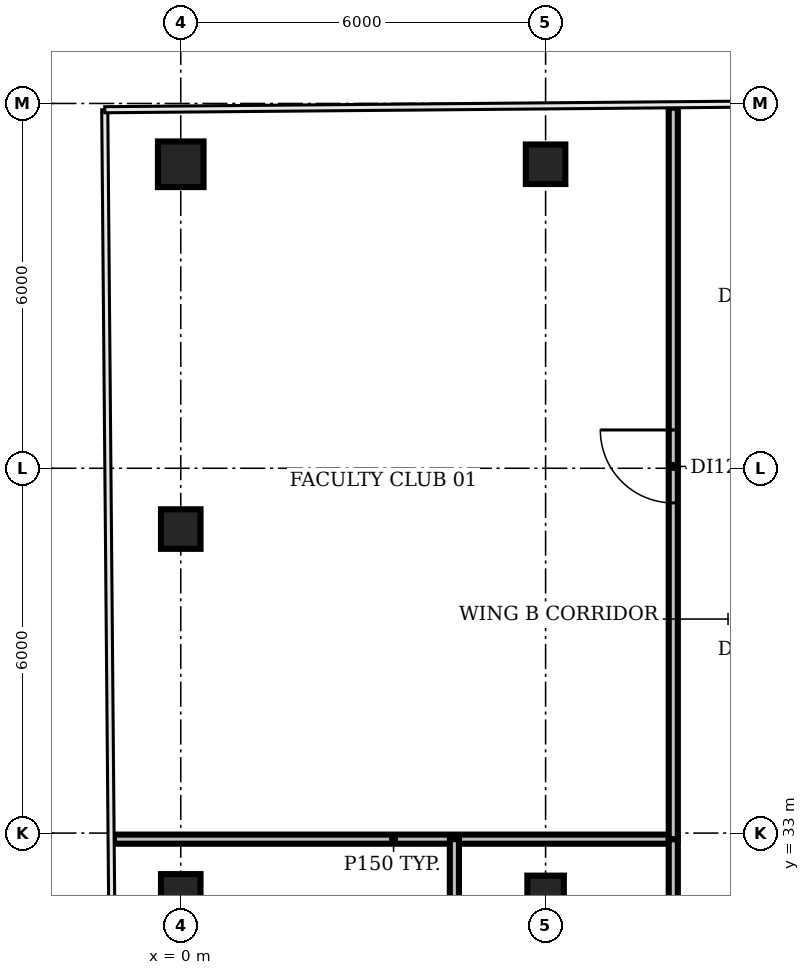
"""IFC4 building model, lengths in metres.
Left out: names, types, materials, properties, quantities, classifications, styles, units other than length and angle.
Written with IfcOpenShell. Run it as: python <this file> out.ifc"""

import sys

from ifc_helpers import new_model, si_unit, direction, frame, frame_2d, origin, origin_2d, place, context, subcontext, project, spatial, rectangle, circle, extrude, element, fill, save


model = new_model("IFC4")
c1 = context("Model", 3, precision=1e-05, world=origin(), true_north=direction((0.0, 1.0)))
c2 = subcontext(c1, "Body", "Model", "MODEL_VIEW")
j1 = project(units=[si_unit("LENGTHUNIT", "METRE"), si_unit("PLANEANGLEUNIT", "RADIAN")], contexts=[c1])
p1 = place(None, origin())
s1 = spatial("IfcSite", under=j1, at=p1, CompositionType="ELEMENT")
p2 = place(p1, origin())
s2 = spatial("IfcBuilding", under=s1, at=p2, CompositionType="ELEMENT")
p3 = place(p2, frame((0.0, 0.0, 331.4)))
s3 = spatial("IfcBuildingStorey", under=s2, at=p3, CompositionType="ELEMENT", Elevation=331.4)
for number, where, z_axis, x_axis in (
    (1, (0.0, 32.0, 0.0), (0.0, 0.0, 1.0), (1.0, 0.0, 0.0)),
    (2, (0.0, 38.0, 0.0), (0.0, 0.0, 1.0), (1.0, 0.0, 0.0)),
):
    element("IfcColumn", number, at=place(p3, frame(where, z_axis=z_axis, x_axis=x_axis)), inside=s3, PredefinedType="COLUMN", context=c2, shape_type="SweptSolid", body=[
        extrude(rectangle(XDim=0.65, YDim=0.65, at=origin_2d()), origin(), (0.0, 0.0, 1.0), 3.9),
    ])
p4 = place(p3, frame((0.0, 44.0, 0.0), z_axis=(0.0, 0.0, 1.0), x_axis=(1.0, 0.0, 0.0)))
e3 = element("IfcColumn", 3, at=p4, inside=s3, PredefinedType="COLUMN", context=c2, shape_type="SweptSolid", body=[
    extrude(circle(Radius=0.375, at=origin_2d()), origin(), (0.0, 0.0, 1.0), 3.9),
])
p5 = place(p3, frame((6.0, 32.0, 0.0), z_axis=(0.0, 0.0, 1.0), x_axis=(1.0, 0.0, 0.0)))
e4 = element("IfcColumn", 4, at=p5, inside=s3, PredefinedType="COLUMN", context=c2, shape_type="SweptSolid", body=[
    extrude(rectangle(XDim=0.6, YDim=0.6, at=origin_2d()), origin(), (0.0, 0.0, 1.0), 3.9),
])
p6 = place(p3, frame((6.0, 44.0, 0.0), z_axis=(0.0, 0.0, 1.0), x_axis=(1.0, 0.0, 0.0)))
e5 = element("IfcColumn", 5, at=p6, inside=s3, PredefinedType="COLUMN", context=c2, shape_type="SweptSolid", body=[
    extrude(rectangle(XDim=0.65, YDim=0.65, at=origin_2d()), origin(), (0.0, 0.0, 1.0), 3.9),
])
p7 = place(p3, frame((-1.1, 32.9, 0.0), z_axis=(0.0, 0.0, 1.0), x_axis=(1.0, 0.0, 0.0)))
e6 = element("IfcWall", 6, at=p7, inside=s3, PredefinedType="PARTITIONING", context=c2, shape_type="SweptSolid", body=[
    extrude(rectangle(XDim=9.2, YDim=0.15, at=frame_2d((4.6, 0.0))), origin(), (0.0, 0.0, 1.0), 2.48),
])
p8 = place(p3, frame((4.5, 28.1, 0.0), z_axis=(0.0, 0.0, 1.0), x_axis=(0.0, 1.0, 0.0)))
e7 = element("IfcWall", 7, at=p8, inside=s3, PredefinedType="PARTITIONING", context=c2, shape_type="SweptSolid", body=[
    extrude(rectangle(XDim=4.8, YDim=0.15, at=frame_2d((2.4, 0.0))), origin(), (0.0, 0.0, 1.0), 2.48),
])
p9 = place(p3, frame((8.1, 28.1, 0.0), z_axis=(0.0, 0.0, 1.0), x_axis=(0.0, 1.0, 0.0)))
e8 = element("IfcWall", 8, at=p9, inside=s3, PredefinedType="PARTITIONING", context=c2, shape_type="SweptSolid", body=[
    extrude(rectangle(XDim=4.8, YDim=0.15, at=frame_2d((2.4, 0.0))), origin(), (0.0, 0.0, 1.0), 2.48),
])
p10 = place(p9, frame((1.3, 0.0, 0.0)))
e9 = element("IfcOpeningElement", 9, at=p10, cuts=e8, PredefinedType="OPENING", context=c2, shape_type="SweptSolid", body=[
    extrude(rectangle(XDim=0.9, YDim=2.1, at=frame_2d((0.45, 1.05))), frame((0.0, 0.085, 0.0), z_axis=(0.0, -1.0, 0.0), x_axis=(1.0, 0.0, 0.0)), (0.0, 0.0, 1.0), 0.17),
])
p11 = place(p3, frame((8.1, 32.9, 0.0), z_axis=(0.0, 0.0, 1.0), x_axis=(0.0, 1.0, 0.0)))
e10 = element("IfcWall", 10, at=p11, inside=s3, PredefinedType="PARTITIONING", context=c2, shape_type="SweptSolid", body=[
    extrude(rectangle(XDim=12.03, YDim=0.15, at=frame_2d((6.015, 0.0))), origin(), (0.0, 0.0, 1.0), 2.48),
])
p12 = place(p11, frame((5.53, 0.0, 0.0)))
e11 = element("IfcOpeningElement", 11, at=p12, cuts=e10, PredefinedType="OPENING", context=c2, shape_type="SweptSolid", body=[
    extrude(rectangle(XDim=1.2, YDim=2.1, at=frame_2d((0.6, 1.05))), frame((0.0, 0.085, 0.0), z_axis=(0.0, -1.0, 0.0), x_axis=(1.0, 0.0, 0.0)), (0.0, 0.0, 1.0), 0.17),
])
p13 = place(p12, origin())
e12 = element("IfcDoor", 12, at=p13, inside=s3, OperationType="SINGLE_SWING_RIGHT", PredefinedType="DOOR", context=c2, shape_type="SweptSolid", body=[
    extrude(rectangle(XDim=1.2, YDim=2.1, at=frame_2d((0.6, 1.05))), frame((0.0, 0.025, 0.0), z_axis=(0.0, -1.0, 0.0), x_axis=(1.0, 0.0, 0.0)), (0.0, 0.0, 1.0), 0.05),
])
fill(e11, e12)
save(model, sys.argv[1])
